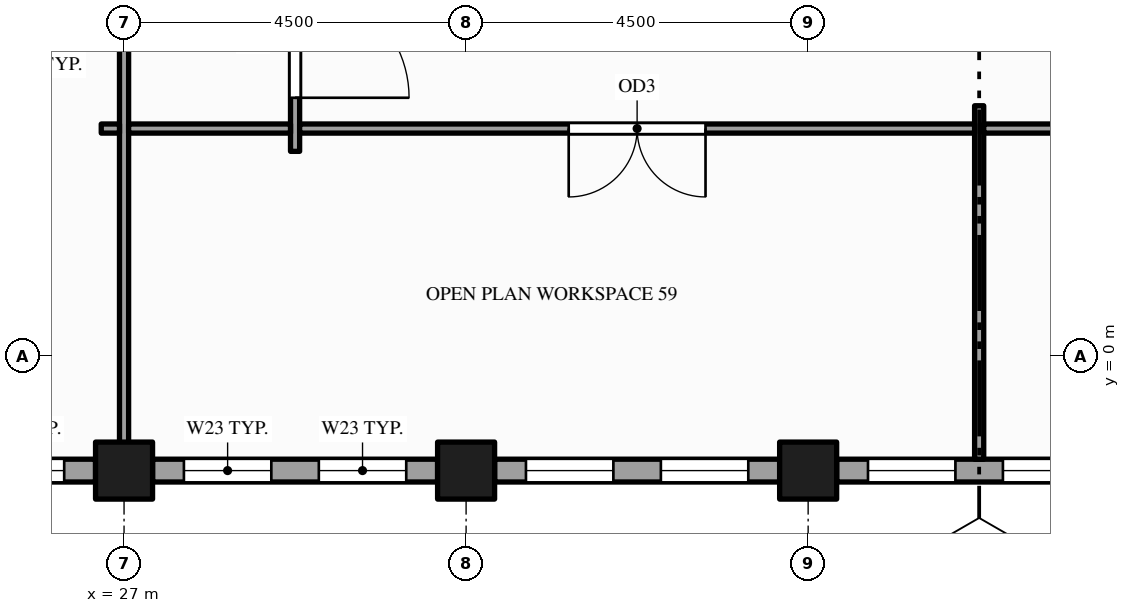
"""IFC4 building model, lengths in metres.
Left out: names, types, materials, properties, quantities, classifications, styles, units other than length and angle.
Written with IfcOpenShell. Run it as: python <this file> out.ifc"""

import sys

from ifc_helpers import new_model, si_unit, direction, frame, frame_2d, origin, origin_2d, place, context, subcontext, project, spatial, rectangle, hollow_rectangle, extrude, element, fill, save


model = new_model("IFC4")
c1 = context("Model", 3, precision=1e-05, world=origin(), true_north=direction((0.0, 1.0)))
c2 = subcontext(c1, "Body", "Model", "MODEL_VIEW")
j1 = project(units=[si_unit("LENGTHUNIT", "METRE"), si_unit("PLANEANGLEUNIT", "RADIAN")], contexts=[c1])
p1 = place(None, origin())
s1 = spatial("IfcSite", under=j1, at=p1, CompositionType="ELEMENT")
p2 = place(p1, origin())
s2 = spatial("IfcBuilding", under=s1, at=p2, CompositionType="ELEMENT")
p3 = place(p2, frame((0.0, 0.0, 227.0)))
s3 = spatial("IfcBuildingStorey", under=s2, at=p3, CompositionType="ELEMENT", Elevation=227.0)
for number, where, z_axis, x_axis in (
    (1, (27.0, -1.5, -0.15), (0.0, 0.0, 1.0), (1.0, 0.0, 0.0)),
    (2, (31.5, -1.5, -0.15), (0.0, 0.0, 1.0), (1.0, 0.0, 0.0)),
    (3, (36.0, -1.5, -0.15), (0.0, 0.0, 1.0), (1.0, 0.0, 0.0)),
):
    element("IfcColumn", number, at=place(p3, frame(where, z_axis=z_axis, x_axis=x_axis)), inside=s3, PredefinedType="COLUMN", context=c2, shape_type="SweptSolid", body=[
        extrude(hollow_rectangle(XDim=0.75, YDim=0.75, WallThickness=0.036, at=origin_2d()), origin(), (0.0, 0.0, 1.0), 4.0),
    ])
p4 = place(p3, frame((22.875, -1.5, 0.0), z_axis=(0.0, 0.0, 1.0), x_axis=(1.0, 0.0, 0.0)))
e4 = element("IfcWall", 4, at=p4, inside=s3, PredefinedType="STANDARD", context=c2, shape_type="SweptSolid", body=[
    extrude(rectangle(XDim=3.75, YDim=0.3, at=frame_2d((1.875, 0.0))), origin(), (0.0, 0.0, 1.0), 2.76),
])
p5 = place(p4, frame((0.413, 0.0, 0.9)))
e5 = element("IfcOpeningElement", 5, at=p5, cuts=e4, PredefinedType="OPENING", context=c2, shape_type="SweptSolid", body=[
    extrude(rectangle(XDim=1.15, YDim=1.5, at=frame_2d((0.575, 0.75))), frame((0.0, 0.16, 0.0), z_axis=(0.0, -1.0, 0.0), x_axis=(1.0, 0.0, 0.0)), (0.0, 0.0, 1.0), 0.32),
])
p6 = place(p4, frame((2.188, 0.0, 0.9)))
e6 = element("IfcOpeningElement", 6, at=p6, cuts=e4, PredefinedType="OPENING", context=c2, shape_type="SweptSolid", body=[
    extrude(rectangle(XDim=1.15, YDim=1.5, at=frame_2d((0.575, 0.75))), frame((0.0, 0.16, 0.0), z_axis=(0.0, -1.0, 0.0), x_axis=(1.0, 0.0, 0.0)), (0.0, 0.0, 1.0), 0.32),
])
p7 = place(p3, frame((27.375, -1.5, 0.0), z_axis=(0.0, 0.0, 1.0), x_axis=(1.0, 0.0, 0.0)))
e7 = element("IfcWall", 7, at=p7, inside=s3, PredefinedType="STANDARD", context=c2, shape_type="SweptSolid", body=[
    extrude(rectangle(XDim=3.75, YDim=0.3, at=frame_2d((1.875, 0.0))), origin(), (0.0, 0.0, 1.0), 2.87),
])
p8 = place(p7, frame((0.413, 0.0, 0.9)))
e8 = element("IfcOpeningElement", 8, at=p8, cuts=e7, PredefinedType="OPENING", context=c2, shape_type="SweptSolid", body=[
    extrude(rectangle(XDim=1.15, YDim=1.75, at=frame_2d((0.575, 0.875))), frame((0.0, 0.16, 0.0), z_axis=(0.0, -1.0, 0.0), x_axis=(1.0, 0.0, 0.0)), (0.0, 0.0, 1.0), 0.32),
])
p9 = place(p7, frame((2.188, 0.0, 0.9)))
e9 = element("IfcOpeningElement", 9, at=p9, cuts=e7, PredefinedType="OPENING", context=c2, shape_type="SweptSolid", body=[
    extrude(rectangle(XDim=1.15, YDim=1.75, at=frame_2d((0.575, 0.875))), frame((0.0, 0.16, 0.0), z_axis=(0.0, -1.0, 0.0), x_axis=(1.0, 0.0, 0.0)), (0.0, 0.0, 1.0), 0.32),
])
p10 = place(p3, frame((31.875, -1.5, 0.0), z_axis=(0.0, 0.0, 1.0), x_axis=(1.0, 0.0, 0.0)))
e10 = element("IfcWall", 10, at=p10, inside=s3, PredefinedType="STANDARD", context=c2, shape_type="SweptSolid", body=[
    extrude(rectangle(XDim=3.75, YDim=0.3, at=frame_2d((1.875, 0.0))), origin(), (0.0, 0.0, 1.0), 2.87),
])
p11 = place(p10, frame((0.413, 0.0, 0.9)))
e11 = element("IfcOpeningElement", 11, at=p11, cuts=e10, PredefinedType="OPENING", context=c2, shape_type="SweptSolid", body=[
    extrude(rectangle(XDim=1.15, YDim=1.75, at=frame_2d((0.575, 0.875))), frame((0.0, 0.16, 0.0), z_axis=(0.0, -1.0, 0.0), x_axis=(1.0, 0.0, 0.0)), (0.0, 0.0, 1.0), 0.32),
])
p12 = place(p10, frame((2.188, 0.0, 0.9)))
e12 = element("IfcOpeningElement", 12, at=p12, cuts=e10, PredefinedType="OPENING", context=c2, shape_type="SweptSolid", body=[
    extrude(rectangle(XDim=1.15, YDim=1.75, at=frame_2d((0.575, 0.875))), frame((0.0, 0.16, 0.0), z_axis=(0.0, -1.0, 0.0), x_axis=(1.0, 0.0, 0.0)), (0.0, 0.0, 1.0), 0.32),
])
p13 = place(p3, frame((36.375, -1.5, 0.0), z_axis=(0.0, 0.0, 1.0), x_axis=(1.0, 0.0, 0.0)))
e13 = element("IfcWall", 13, at=p13, inside=s3, PredefinedType="STANDARD", context=c2, shape_type="SweptSolid", body=[
    extrude(rectangle(XDim=3.75, YDim=0.3, at=frame_2d((1.875, 0.0))), origin(), (0.0, 0.0, 1.0), 2.87),
])
p14 = place(p13, frame((0.413, 0.0, 0.9)))
e14 = element("IfcOpeningElement", 14, at=p14, cuts=e13, PredefinedType="OPENING", context=c2, shape_type="SweptSolid", body=[
    extrude(rectangle(XDim=1.15, YDim=1.75, at=frame_2d((0.575, 0.875))), frame((0.0, 0.16, 0.0), z_axis=(0.0, -1.0, 0.0), x_axis=(1.0, 0.0, 0.0)), (0.0, 0.0, 1.0), 0.32),
])
p15 = place(p13, frame((2.188, 0.0, 0.9)))
e15 = element("IfcOpeningElement", 15, at=p15, cuts=e13, PredefinedType="OPENING", context=c2, shape_type="SweptSolid", body=[
    extrude(rectangle(XDim=1.15, YDim=1.75, at=frame_2d((0.575, 0.875))), frame((0.0, 0.16, 0.0), z_axis=(0.0, -1.0, 0.0), x_axis=(1.0, 0.0, 0.0)), (0.0, 0.0, 1.0), 0.32),
])
p16 = place(p3, frame((27.0, -1.35, 0.0), z_axis=(0.0, 0.0, 1.0), x_axis=(0.0, 1.0, 0.0)))
e16 = element("IfcWall", 16, at=p16, inside=s3, PredefinedType="PARTITIONING", context=c2, shape_type="SweptSolid", body=[
    extrude(rectangle(XDim=22.48, YDim=0.12, at=frame_2d((11.24, 0.0))), origin(), (0.0, 0.0, 1.0), 2.87),
])
p17 = place(p16, frame((10.725, 0.0, 0.0)))
e17 = element("IfcOpeningElement", 17, at=p17, cuts=e16, PredefinedType="OPENING", context=c2, shape_type="SweptSolid", body=[
    extrude(rectangle(XDim=1.5, YDim=2.1, at=frame_2d((0.75, 1.05))), frame((0.0, 0.07, 0.0), z_axis=(0.0, -1.0, 0.0), x_axis=(1.0, 0.0, 0.0)), (0.0, 0.0, 1.0), 0.14),
])
p18 = place(p16, frame((14.625, 0.0, 0.0)))
e18 = element("IfcOpeningElement", 18, at=p18, cuts=e16, PredefinedType="OPENING", context=c2, shape_type="SweptSolid", body=[
    extrude(rectangle(XDim=1.2, YDim=2.1, at=frame_2d((0.6, 1.05))), frame((0.0, 0.07, 0.0), z_axis=(0.0, -1.0, 0.0), x_axis=(1.0, 0.0, 0.0)), (0.0, 0.0, 1.0), 0.14),
])
p19 = place(p3, frame((29.25, 2.7, 0.0), z_axis=(0.0, 0.0, 1.0), x_axis=(0.0, 1.0, 0.0)))
e19 = element("IfcWall", 19, at=p19, inside=s3, PredefinedType="PARTITIONING", context=c2, shape_type="SweptSolid", body=[
    extrude(rectangle(XDim=14.1, YDim=0.12, at=frame_2d((7.05, 0.0))), origin(), (0.0, 0.0, 1.0), 2.87),
])
p20 = place(p19, frame((0.705, 0.0, 0.0)))
e20 = element("IfcOpeningElement", 20, at=p20, cuts=e19, PredefinedType="OPENING", context=c2, shape_type="SweptSolid", body=[
    extrude(rectangle(XDim=1.5, YDim=2.1, at=frame_2d((0.75, 1.05))), frame((0.0, 0.07, 0.0), z_axis=(0.0, -1.0, 0.0), x_axis=(1.0, 0.0, 0.0)), (0.0, 0.0, 1.0), 0.14),
])
p21 = place(p19, frame((11.895, 0.0, 0.0)))
e21 = element("IfcOpeningElement", 21, at=p21, cuts=e19, PredefinedType="OPENING", context=c2, shape_type="SweptSolid", body=[
    extrude(rectangle(XDim=1.5, YDim=2.1, at=frame_2d((0.75, 1.05))), frame((0.0, 0.07, 0.0), z_axis=(0.0, -1.0, 0.0), x_axis=(1.0, 0.0, 0.0)), (0.0, 0.0, 1.0), 0.14),
])
p22 = place(p3, frame((38.25, -1.35, 0.0), z_axis=(0.0, 0.0, 1.0), x_axis=(0.0, 1.0, 0.0)))
e22 = element("IfcWall", 22, at=p22, inside=s3, PredefinedType="PARTITIONING", context=c2, shape_type="SweptSolid", body=[
    extrude(rectangle(XDim=4.65, YDim=0.12, at=frame_2d((2.325, 0.0))), origin(), (0.0, 0.0, 1.0), 2.87),
])
p23 = place(p3, frame((26.7, 3.0, 0.0), z_axis=(0.0, 0.0, 1.0), x_axis=(1.0, 0.0, 0.0)))
e23 = element("IfcWall", 23, at=p23, inside=s3, PredefinedType="PARTITIONING", context=c2, shape_type="SweptSolid", body=[
    extrude(rectangle(XDim=0.24, YDim=0.12, at=frame_2d((0.12, 0.0))), origin(), (0.0, 0.0, 1.0), 2.87),
])
p24 = place(p3, frame((27.06, 3.0, 0.0), z_axis=(0.0, 0.0, 1.0), x_axis=(1.0, 0.0, 0.0)))
e24 = element("IfcWall", 24, at=p24, inside=s3, PredefinedType="PARTITIONING", context=c2, shape_type="SweptSolid", body=[
    extrude(rectangle(XDim=2.13, YDim=0.12, at=frame_2d((1.065, 0.0))), origin(), (0.0, 0.0, 1.0), 2.87),
])
p25 = place(p3, frame((29.31, 3.0, 0.0), z_axis=(0.0, 0.0, 1.0), x_axis=(1.0, 0.0, 0.0)))
e25 = element("IfcWall", 25, at=p25, inside=s3, PredefinedType="PARTITIONING", context=c2, shape_type="SweptSolid", body=[
    extrude(rectangle(XDim=8.88, YDim=0.12, at=frame_2d((4.44, 0.0))), origin(), (0.0, 0.0, 1.0), 2.87),
])
p26 = place(p25, frame((3.54, 0.0, 0.0)))
e26 = element("IfcOpeningElement", 26, at=p26, cuts=e25, PredefinedType="OPENING", context=c2, shape_type="SweptSolid", body=[
    extrude(rectangle(XDim=1.8, YDim=2.1, at=frame_2d((0.9, 1.05))), frame((0.0, 0.07, 0.0), z_axis=(0.0, -1.0, 0.0), x_axis=(1.0, 0.0, 0.0)), (0.0, 0.0, 1.0), 0.14),
])
p27 = place(p3, frame((38.31, 3.0, 0.0), z_axis=(0.0, 0.0, 1.0), x_axis=(1.0, 0.0, 0.0)))
e27 = element("IfcWall", 27, at=p27, inside=s3, PredefinedType="PARTITIONING", context=c2, shape_type="SweptSolid", body=[
    extrude(rectangle(XDim=4.38, YDim=0.12, at=frame_2d((2.19, 0.0))), origin(), (0.0, 0.0, 1.0), 2.87),
])
p28 = place(p27, frame((1.69, 0.0, 0.0)))
e28 = element("IfcOpeningElement", 28, at=p28, cuts=e27, PredefinedType="OPENING", context=c2, shape_type="SweptSolid", body=[
    extrude(rectangle(XDim=1.0, YDim=2.1, at=frame_2d((0.5, 1.05))), frame((0.0, 0.07, 0.0), z_axis=(0.0, -1.0, 0.0), x_axis=(1.0, 0.0, 0.0)), (0.0, 0.0, 1.0), 0.14),
])
p29 = place(p6, origin())
e29 = element("IfcWindow", 29, at=p29, inside=s3, PartitioningType="SINGLE_PANEL", PredefinedType="WINDOW", context=c2, shape_type="SweptSolid", body=[
    extrude(rectangle(XDim=1.15, YDim=1.5, at=frame_2d((0.575, 0.75))), frame((0.0, 0.03, 0.0), z_axis=(0.0, -1.0, 0.0), x_axis=(1.0, 0.0, 0.0)), (0.0, 0.0, 1.0), 0.06),
])
fill(e6, e29)
p30 = place(p8, origin())
e30 = element("IfcWindow", 30, at=p30, inside=s3, PartitioningType="SINGLE_PANEL", PredefinedType="WINDOW", context=c2, shape_type="SweptSolid", body=[
    extrude(rectangle(XDim=1.15, YDim=1.75, at=frame_2d((0.575, 0.875))), frame((0.0, 0.03, 0.0), z_axis=(0.0, -1.0, 0.0), x_axis=(1.0, 0.0, 0.0)), (0.0, 0.0, 1.0), 0.06),
])
fill(e8, e30)
p31 = place(p9, origin())
e31 = element("IfcWindow", 31, at=p31, inside=s3, PartitioningType="SINGLE_PANEL", PredefinedType="WINDOW", context=c2, shape_type="SweptSolid", body=[
    extrude(rectangle(XDim=1.15, YDim=1.75, at=frame_2d((0.575, 0.875))), frame((0.0, 0.03, 0.0), z_axis=(0.0, -1.0, 0.0), x_axis=(1.0, 0.0, 0.0)), (0.0, 0.0, 1.0), 0.06),
])
fill(e9, e31)
p32 = place(p11, origin())
e32 = element("IfcWindow", 32, at=p32, inside=s3, PartitioningType="SINGLE_PANEL", PredefinedType="WINDOW", context=c2, shape_type="SweptSolid", body=[
    extrude(rectangle(XDim=1.15, YDim=1.75, at=frame_2d((0.575, 0.875))), frame((0.0, 0.03, 0.0), z_axis=(0.0, -1.0, 0.0), x_axis=(1.0, 0.0, 0.0)), (0.0, 0.0, 1.0), 0.06),
])
fill(e11, e32)
p33 = place(p12, origin())
e33 = element("IfcWindow", 33, at=p33, inside=s3, PartitioningType="SINGLE_PANEL", PredefinedType="WINDOW", context=c2, shape_type="SweptSolid", body=[
    extrude(rectangle(XDim=1.15, YDim=1.75, at=frame_2d((0.575, 0.875))), frame((0.0, 0.03, 0.0), z_axis=(0.0, -1.0, 0.0), x_axis=(1.0, 0.0, 0.0)), (0.0, 0.0, 1.0), 0.06),
])
fill(e12, e33)
p34 = place(p14, origin())
e34 = element("IfcWindow", 34, at=p34, inside=s3, PartitioningType="SINGLE_PANEL", PredefinedType="WINDOW", context=c2, shape_type="SweptSolid", body=[
    extrude(rectangle(XDim=1.15, YDim=1.75, at=frame_2d((0.575, 0.875))), frame((0.0, 0.03, 0.0), z_axis=(0.0, -1.0, 0.0), x_axis=(1.0, 0.0, 0.0)), (0.0, 0.0, 1.0), 0.06),
])
fill(e14, e34)
p35 = place(p15, origin())
e35 = element("IfcWindow", 35, at=p35, inside=s3, PartitioningType="SINGLE_PANEL", PredefinedType="WINDOW", context=c2, shape_type="SweptSolid", body=[
    extrude(rectangle(XDim=1.15, YDim=1.75, at=frame_2d((0.575, 0.875))), frame((0.0, 0.03, 0.0), z_axis=(0.0, -1.0, 0.0), x_axis=(1.0, 0.0, 0.0)), (0.0, 0.0, 1.0), 0.06),
])
fill(e15, e35)
p36 = place(p20, origin())
e36 = element("IfcDoor", 36, at=p36, inside=s3, OperationType="SINGLE_SWING_LEFT", PredefinedType="DOOR", context=c2, shape_type="SweptSolid", body=[
    extrude(rectangle(XDim=1.5, YDim=2.1, at=frame_2d((0.75, 1.05))), frame((0.0, 0.025, 0.0), z_axis=(0.0, -1.0, 0.0), x_axis=(1.0, 0.0, 0.0)), (0.0, 0.0, 1.0), 0.05),
])
fill(e20, e36)
p37 = place(p26, origin())
e37 = element("IfcDoor", 37, at=p37, inside=s3, OperationType="DOUBLE_DOOR_SINGLE_SWING", PredefinedType="DOOR", context=c2, shape_type="SweptSolid", body=[
    extrude(rectangle(XDim=1.8, YDim=2.1, at=frame_2d((0.9, 1.05))), frame((0.0, 0.025, 0.0), z_axis=(0.0, -1.0, 0.0), x_axis=(1.0, 0.0, 0.0)), (0.0, 0.0, 1.0), 0.05),
])
fill(e26, e37)
save(model, sys.argv[1])
